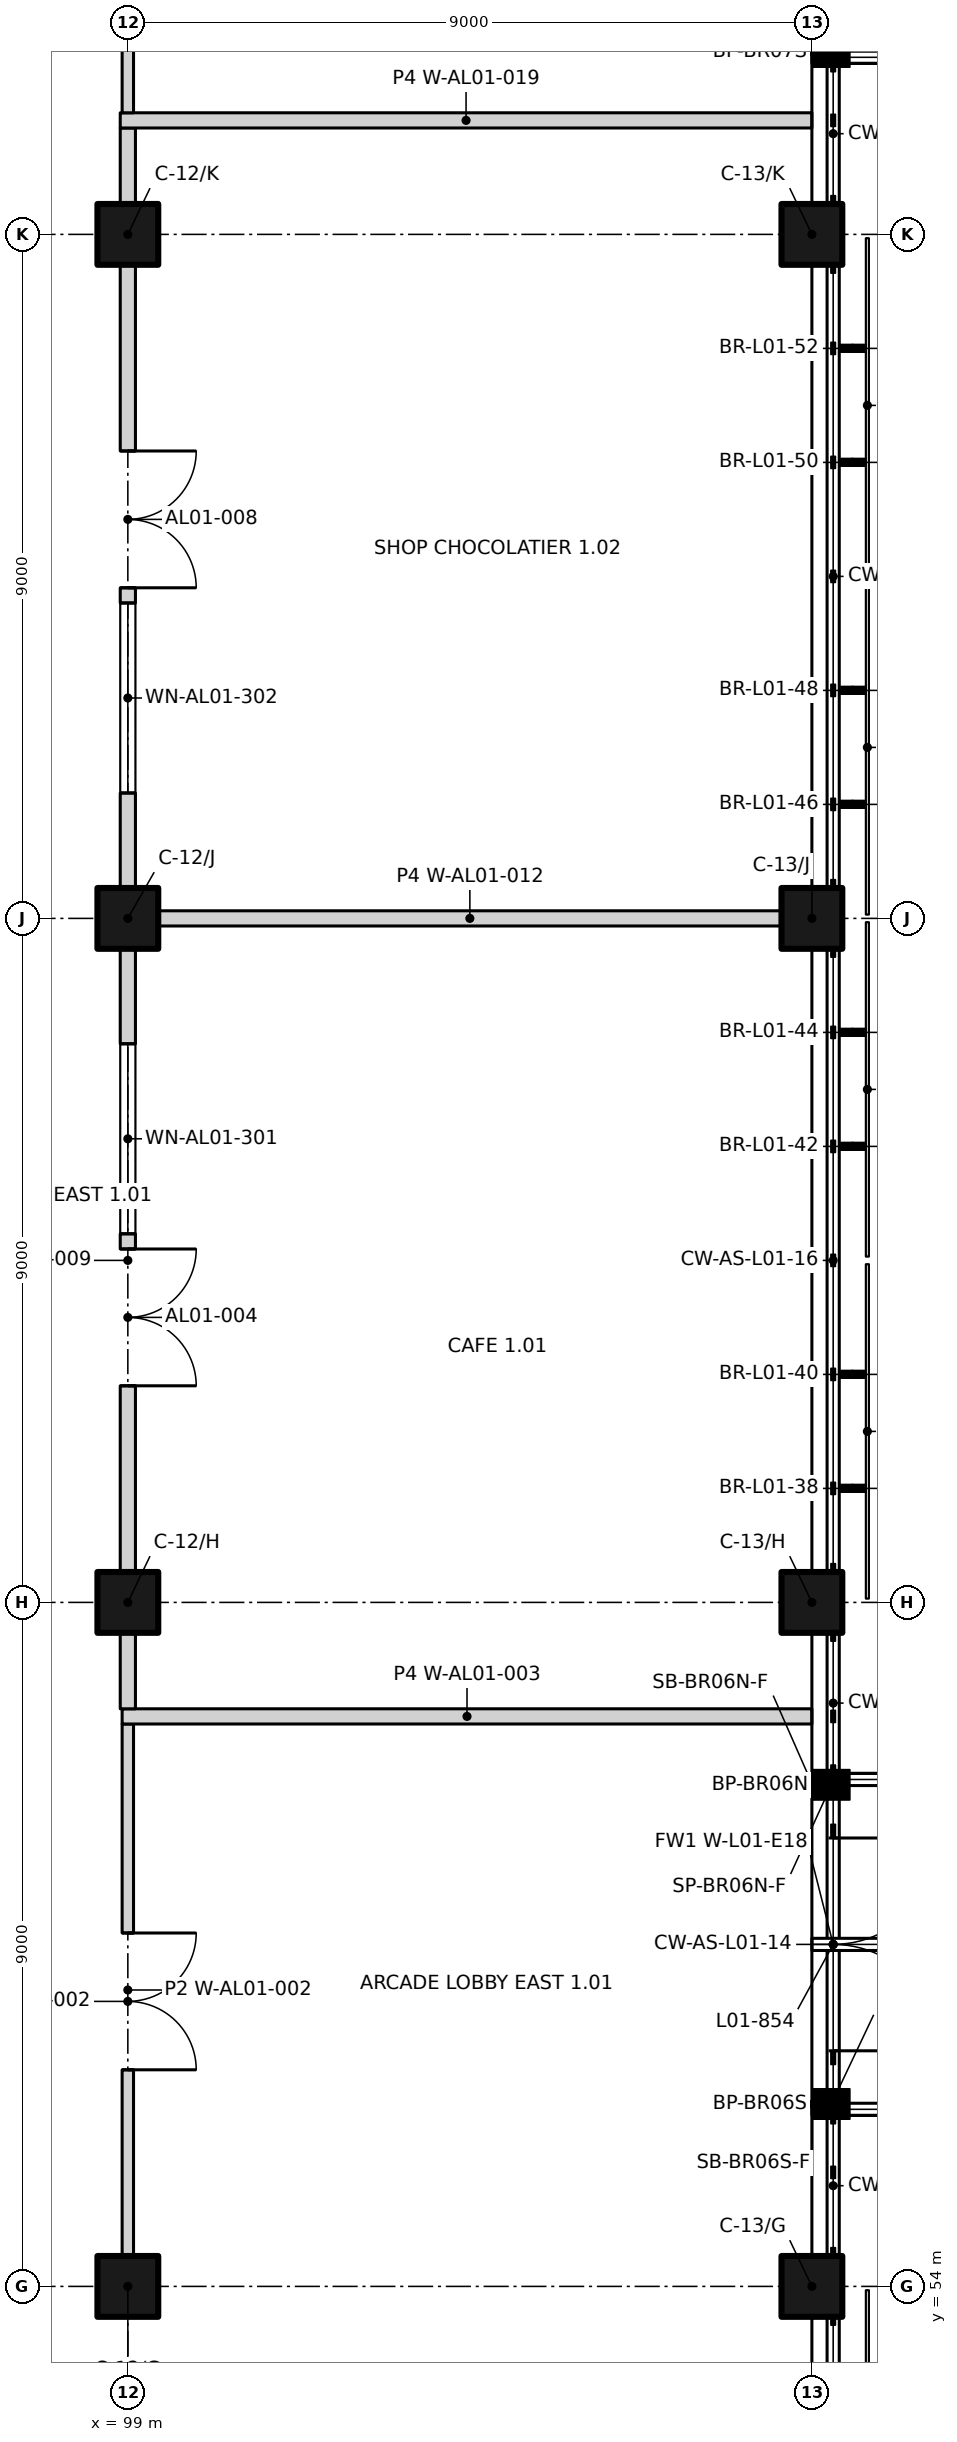
"""IFC4 building model, lengths in metres.
Left out: names, types, materials, properties, quantities, classifications, styles, units other than length and angle.
Written with IfcOpenShell. Run it as: python <this file> out.ifc"""

import sys

from ifc_helpers import new_model, si_unit, direction, frame, frame_2d, origin, origin_2d, place, context, subcontext, project, spatial, rectangle, extrude, element, fill, save


model = new_model("IFC4")
c1 = context("Model", 3, precision=1e-05, world=origin(), true_north=direction((0.0, 1.0)))
c2 = subcontext(c1, "Body", "Model", "MODEL_VIEW")
j1 = project(units=[si_unit("LENGTHUNIT", "METRE"), si_unit("PLANEANGLEUNIT", "RADIAN")], contexts=[c1])
p1 = place(None, origin())
s1 = spatial("IfcSite", under=j1, at=p1, CompositionType="ELEMENT")
p2 = place(p1, origin())
s2 = spatial("IfcBuilding", under=s1, at=p2, CompositionType="ELEMENT")
p3 = place(p2, frame((0.0, 0.0, 6.0)))
s3 = spatial("IfcBuildingStorey", under=s2, at=p3, CompositionType="ELEMENT", Elevation=6.0)
for number, where, z_axis, x_axis in (
    (1, (99.0, 54.0, 0.0), (0.0, 0.0, 1.0), (1.0, 0.0, 0.0)),
    (2, (108.0, 54.0, 0.0), (0.0, 0.0, 1.0), (1.0, 0.0, 0.0)),
    (3, (99.0, 63.0, 0.0), (0.0, 0.0, 1.0), (1.0, 0.0, 0.0)),
    (4, (108.0, 63.0, 0.0), (0.0, 0.0, 1.0), (1.0, 0.0, 0.0)),
    (5, (99.0, 72.0, 0.0), (0.0, 0.0, 1.0), (1.0, 0.0, 0.0)),
    (6, (108.0, 72.0, 0.0), (0.0, 0.0, 1.0), (1.0, 0.0, 0.0)),
    (7, (99.0, 81.0, 0.0), (0.0, 0.0, 1.0), (1.0, 0.0, 0.0)),
    (8, (108.0, 81.0, 0.0), (0.0, 0.0, 1.0), (1.0, 0.0, 0.0)),
):
    element("IfcColumn", number, at=place(p3, frame(where, z_axis=z_axis, x_axis=x_axis)), inside=s3, PredefinedType="COLUMN", context=c2, shape_type="SweptSolid", body=[
        extrude(rectangle(XDim=0.8, YDim=0.8, at=origin_2d()), origin(), (0.0, 0.0, 1.0), 4.5),
    ])
p4 = place(p3, frame((108.28, 59.97, 0.0), z_axis=(0.0, 0.0, 1.0), x_axis=(0.0, -1.0, 0.0)))
e9 = element("IfcWall", 9, at=p4, inside=s3, PredefinedType="STANDARD", context=c2, shape_type="SweptSolid", body=[
    extrude(rectangle(XDim=2.94, YDim=0.12, at=frame_2d((1.47, 0.0))), origin(), (0.0, 0.0, 1.0), 2.97),
])
p5 = place(p4, frame((0.07, 0.0, 0.0)))
e10 = element("IfcOpeningElement", 10, at=p5, cuts=e9, PredefinedType="OPENING", context=c2, shape_type="SweptSolid", body=[
    extrude(rectangle(XDim=2.8, YDim=2.4, at=frame_2d((1.4, 1.2))), frame((0.0, 0.07, 0.0), z_axis=(0.0, -1.0, 0.0), x_axis=(1.0, 0.0, 0.0)), (0.0, 0.0, 1.0), 0.14),
])
p6 = place(p3, frame((99.0, 54.4, 0.0), z_axis=(0.0, 0.0, 1.0), x_axis=(0.0, 1.0, 0.0)))
e11 = element("IfcWall", 11, at=p6, inside=s3, PredefinedType="PARTITIONING", context=c2, shape_type="SweptSolid", body=[
    extrude(rectangle(XDim=7.0, YDim=0.15, at=frame_2d((3.5, 0.0))), origin(), (0.0, 0.0, 1.0), 3.7),
])
p7 = place(p6, frame((4.25, 0.0, 0.0), z_axis=(0.0, 0.0, 1.0), x_axis=(-1.0, 0.0, 0.0)))
e12 = element("IfcOpeningElement", 12, at=p7, cuts=e11, PredefinedType="OPENING", context=c2, shape_type="SweptSolid", body=[
    extrude(rectangle(XDim=1.8, YDim=2.1, at=frame_2d((0.9, 1.05))), frame((0.0, 0.085, 0.0), z_axis=(0.0, -1.0, 0.0), x_axis=(1.0, 0.0, 0.0)), (0.0, 0.0, 1.0), 0.17),
])
p8 = place(p3, frame((98.925, 61.5, 0.0), z_axis=(0.0, 0.0, 1.0), x_axis=(1.0, 0.0, 0.0)))
e13 = element("IfcWall", 13, at=p8, inside=s3, PredefinedType="PARTITIONING", context=c2, shape_type="SweptSolid", body=[
    extrude(rectangle(XDim=9.075, YDim=0.2, at=frame_2d((4.538, 0.0))), origin(), (0.0, 0.0, 1.0), 3.7),
])
p9 = place(p3, frame((99.0, 61.6, 0.0), z_axis=(0.0, 0.0, 1.0), x_axis=(0.0, 1.0, 0.0)))
e14 = element("IfcWall", 14, at=p9, inside=s3, PredefinedType="PARTITIONING", context=c2, shape_type="SweptSolid", body=[
    extrude(rectangle(XDim=1.0, YDim=0.2, at=frame_2d((0.5, 0.0))), origin(), (0.0, 0.0, 1.0), 3.7),
])
p10 = place(p3, frame((99.0, 63.4, 0.0), z_axis=(0.0, 0.0, 1.0), x_axis=(0.0, 1.0, 0.0)))
e15 = element("IfcWall", 15, at=p10, inside=s3, PredefinedType="PARTITIONING", context=c2, shape_type="SweptSolid", body=[
    extrude(rectangle(XDim=8.2, YDim=0.2, at=frame_2d((4.1, 0.0))), origin(), (0.0, 0.0, 1.0), 3.7),
])
p11 = place(p10, frame((4.25, 0.0, 0.0), z_axis=(0.0, 0.0, 1.0), x_axis=(-1.0, 0.0, 0.0)))
e16 = element("IfcOpeningElement", 16, at=p11, cuts=e15, PredefinedType="OPENING", context=c2, shape_type="SweptSolid", body=[
    extrude(rectangle(XDim=1.8, YDim=2.1, at=frame_2d((0.9, 1.05))), frame((0.0, 0.11, 0.0), z_axis=(0.0, -1.0, 0.0), x_axis=(1.0, 0.0, 0.0)), (0.0, 0.0, 1.0), 0.22),
])
p12 = place(p10, frame((4.45, 0.0, 0.15)))
e17 = element("IfcOpeningElement", 17, at=p12, cuts=e15, PredefinedType="OPENING", context=c2, shape_type="SweptSolid", body=[
    extrude(rectangle(XDim=2.5, YDim=2.4, at=frame_2d((1.25, 1.2))), frame((0.0, 0.11, 0.0), z_axis=(0.0, -1.0, 0.0), x_axis=(1.0, 0.0, 0.0)), (0.0, 0.0, 1.0), 0.22),
])
p13 = place(p3, frame((99.4, 72.0, 0.0), z_axis=(0.0, 0.0, 1.0), x_axis=(1.0, 0.0, 0.0)))
e18 = element("IfcWall", 18, at=p13, inside=s3, PredefinedType="PARTITIONING", context=c2, shape_type="SweptSolid", body=[
    extrude(rectangle(XDim=8.2, YDim=0.2, at=frame_2d((4.1, 0.0))), origin(), (0.0, 0.0, 1.0), 4.15),
])
p14 = place(p3, frame((99.0, 72.4, 0.0), z_axis=(0.0, 0.0, 1.0), x_axis=(0.0, 1.0, 0.0)))
e19 = element("IfcWall", 19, at=p14, inside=s3, PredefinedType="PARTITIONING", context=c2, shape_type="SweptSolid", body=[
    extrude(rectangle(XDim=8.2, YDim=0.2, at=frame_2d((4.1, 0.0))), origin(), (0.0, 0.0, 1.0), 3.7),
])
p15 = place(p14, frame((5.75, 0.0, 0.0), z_axis=(0.0, 0.0, 1.0), x_axis=(-1.0, 0.0, 0.0)))
e20 = element("IfcOpeningElement", 20, at=p15, cuts=e19, PredefinedType="OPENING", context=c2, shape_type="SweptSolid", body=[
    extrude(rectangle(XDim=1.8, YDim=2.1, at=frame_2d((0.9, 1.05))), frame((0.0, 0.11, 0.0), z_axis=(0.0, -1.0, 0.0), x_axis=(1.0, 0.0, 0.0)), (0.0, 0.0, 1.0), 0.22),
])
p16 = place(p14, frame((1.25, 0.0, 0.15)))
e21 = element("IfcOpeningElement", 21, at=p16, cuts=e19, PredefinedType="OPENING", context=c2, shape_type="SweptSolid", body=[
    extrude(rectangle(XDim=2.5, YDim=2.4, at=frame_2d((1.25, 1.2))), frame((0.0, 0.11, 0.0), z_axis=(0.0, -1.0, 0.0), x_axis=(1.0, 0.0, 0.0)), (0.0, 0.0, 1.0), 0.22),
])
p17 = place(p3, frame((99.0, 81.4, 0.0), z_axis=(0.0, 0.0, 1.0), x_axis=(0.0, 1.0, 0.0)))
e22 = element("IfcWall", 22, at=p17, inside=s3, PredefinedType="PARTITIONING", context=c2, shape_type="SweptSolid", body=[
    extrude(rectangle(XDim=1.0, YDim=0.2, at=frame_2d((0.5, 0.0))), origin(), (0.0, 0.0, 1.0), 3.7),
])
p18 = place(p3, frame((98.9, 82.5, 0.0), z_axis=(0.0, 0.0, 1.0), x_axis=(1.0, 0.0, 0.0)))
e23 = element("IfcWall", 23, at=p18, inside=s3, PredefinedType="PARTITIONING", context=c2, shape_type="SweptSolid", body=[
    extrude(rectangle(XDim=9.1, YDim=0.2, at=frame_2d((4.55, 0.0))), origin(), (0.0, 0.0, 1.0), 3.45),
])
p19 = place(p3, frame((99.0, 82.6, 0.0), z_axis=(0.0, 0.0, 1.0), x_axis=(0.0, 1.0, 0.0)))
e24 = element("IfcWall", 24, at=p19, inside=s3, PredefinedType="PARTITIONING", context=c2, shape_type="SweptSolid", body=[
    extrude(rectangle(XDim=7.0, YDim=0.15, at=frame_2d((3.5, 0.0))), origin(), (0.0, 0.0, 1.0), 3.7),
])
p20 = place(p5, origin())
e25 = element("IfcDoor", 25, at=p20, inside=s3, OperationType="DOUBLE_DOOR_SINGLE_SWING", PredefinedType="DOOR", context=c2, shape_type="SweptSolid", body=[
    extrude(rectangle(XDim=2.8, YDim=2.4, at=frame_2d((1.4, 1.2))), frame((0.0, 0.025, 0.0), z_axis=(0.0, -1.0, 0.0), x_axis=(1.0, 0.0, 0.0)), (0.0, 0.0, 1.0), 0.05),
])
fill(e10, e25)
p21 = place(p7, origin())
e26 = element("IfcDoor", 26, at=p21, inside=s3, OperationType="DOUBLE_DOOR_SINGLE_SWING", PredefinedType="DOOR", context=c2, shape_type="SweptSolid", body=[
    extrude(rectangle(XDim=1.8, YDim=2.1, at=frame_2d((0.9, 1.05))), frame((0.0, 0.025, 0.0), z_axis=(0.0, -1.0, 0.0), x_axis=(1.0, 0.0, 0.0)), (0.0, 0.0, 1.0), 0.05),
])
fill(e12, e26)
p22 = place(p11, origin())
e27 = element("IfcDoor", 27, at=p22, inside=s3, OperationType="DOUBLE_DOOR_SINGLE_SWING", PredefinedType="DOOR", context=c2, shape_type="SweptSolid", body=[
    extrude(rectangle(XDim=1.8, YDim=2.1, at=frame_2d((0.9, 1.05))), frame((0.0, 0.025, 0.0), z_axis=(0.0, -1.0, 0.0), x_axis=(1.0, 0.0, 0.0)), (0.0, 0.0, 1.0), 0.05),
])
fill(e16, e27)
p23 = place(p15, origin())
e28 = element("IfcDoor", 28, at=p23, inside=s3, OperationType="DOUBLE_DOOR_SINGLE_SWING", PredefinedType="DOOR", context=c2, shape_type="SweptSolid", body=[
    extrude(rectangle(XDim=1.8, YDim=2.1, at=frame_2d((0.9, 1.05))), frame((0.0, 0.025, 0.0), z_axis=(0.0, -1.0, 0.0), x_axis=(1.0, 0.0, 0.0)), (0.0, 0.0, 1.0), 0.05),
])
fill(e20, e28)
p24 = place(p12, origin())
e29 = element("IfcWindow", 29, at=p24, inside=s3, PartitioningType="SINGLE_PANEL", PredefinedType="WINDOW", context=c2, shape_type="SweptSolid", body=[
    extrude(rectangle(XDim=2.5, YDim=2.4, at=frame_2d((1.25, 1.2))), frame((0.0, 0.03, 0.0), z_axis=(0.0, -1.0, 0.0), x_axis=(1.0, 0.0, 0.0)), (0.0, 0.0, 1.0), 0.06),
])
fill(e17, e29)
p25 = place(p16, origin())
e30 = element("IfcWindow", 30, at=p25, inside=s3, PartitioningType="SINGLE_PANEL", PredefinedType="WINDOW", context=c2, shape_type="SweptSolid", body=[
    extrude(rectangle(XDim=2.5, YDim=2.4, at=frame_2d((1.25, 1.2))), frame((0.0, 0.03, 0.0), z_axis=(0.0, -1.0, 0.0), x_axis=(1.0, 0.0, 0.0)), (0.0, 0.0, 1.0), 0.06),
])
fill(e21, e30)
save(model, sys.argv[1])
